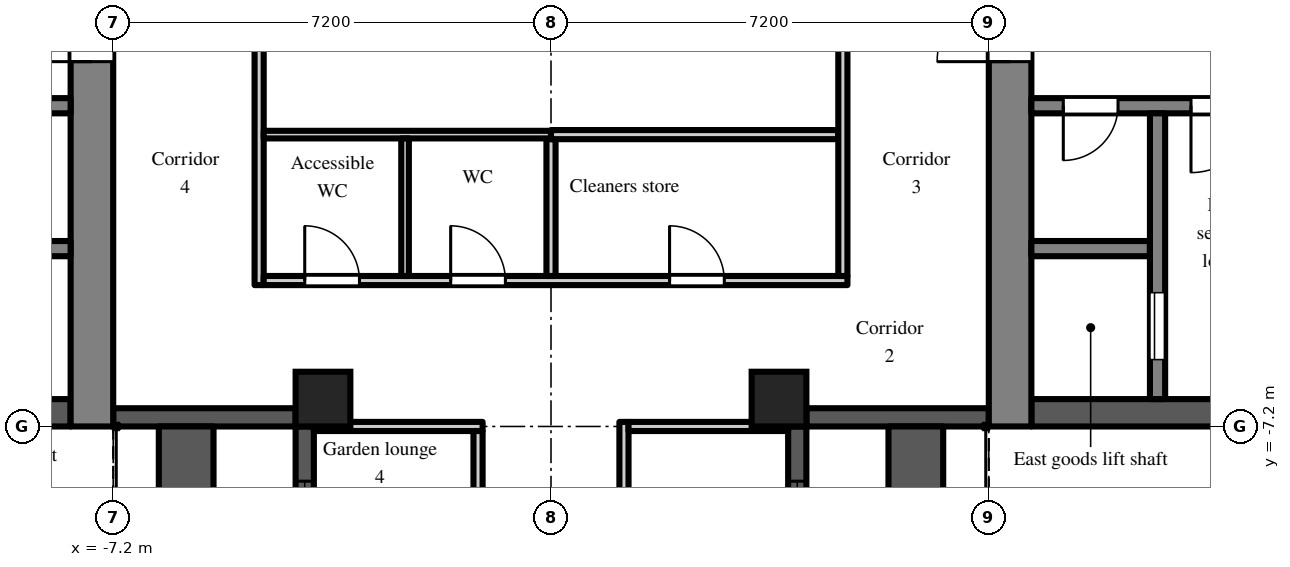
"""IFC4 building model, lengths in metres.
Left out: names, types, materials, properties, quantities, classifications, styles, units other than length and angle.
Written with IfcOpenShell. Run it as: python <this file> out.ifc"""

import sys

from ifc_helpers import new_model, si_unit, direction, frame, frame_2d, origin, origin_2d, place, context, subcontext, project, spatial, rectangle, extrude, element, fill, save


model = new_model("IFC4")
c1 = context("Model", 3, precision=1e-05, world=origin(), true_north=direction((0.0, 1.0)))
c2 = subcontext(c1, "Body", "Model", "MODEL_VIEW")
j1 = project(units=[si_unit("LENGTHUNIT", "METRE"), si_unit("PLANEANGLEUNIT", "RADIAN")], contexts=[c1])
p1 = place(None, origin())
s1 = spatial("IfcSite", under=j1, at=p1, CompositionType="ELEMENT")
p2 = place(p1, origin())
s2 = spatial("IfcBuilding", under=s1, at=p2, CompositionType="ELEMENT")
p3 = place(p2, frame((0.0, 0.0, 120.3)))
s3 = spatial("IfcBuildingStorey", under=s2, at=p3, CompositionType="ELEMENT", Elevation=120.3)
for number, where, z_axis, x_axis in (
    (1, (-3.75, -6.75, 0.0), (0.0, 0.0, 1.0), (1.0, 0.0, 0.0)),
    (2, (3.75, -6.75, 0.0), (0.0, 0.0, 1.0), (1.0, 0.0, 0.0)),
):
    element("IfcColumn", number, at=place(p3, frame(where, z_axis=z_axis, x_axis=x_axis)), inside=s3, PredefinedType="COLUMN", context=c2, shape_type="SweptSolid", body=[
        extrude(rectangle(XDim=0.9, YDim=0.9, at=origin_2d()), origin(), (0.0, 0.0, 1.0), 3.0),
    ])
p4 = place(p3, frame((-7.2, -7.05, 0.0), z_axis=(0.0, 0.0, 1.0), x_axis=(1.0, 0.0, 0.0)))
e3 = element("IfcWall", 3, at=p4, inside=s3, PredefinedType="SOLIDWALL", context=c2, shape_type="SweptSolid", body=[
    extrude(rectangle(XDim=3.0, YDim=0.3, at=frame_2d((1.5, 0.0))), origin(), (0.0, 0.0, 1.0), 2.2),
])
p5 = place(p3, frame((-4.05, -7.2, 0.0), z_axis=(0.0, 0.0, 1.0), x_axis=(0.0, -1.0, 0.0)))
e4 = element("IfcWall", 4, at=p5, inside=s3, PredefinedType="SOLIDWALL", context=c2, shape_type="SweptSolid", body=[
    extrude(rectangle(XDim=7.2, YDim=0.3, at=frame_2d((3.6, 0.0))), origin(), (0.0, 0.0, 1.0), 2.2),
])
p6 = place(p5, frame((3.0, 0.0, 0.0)))
e5 = element("IfcOpeningElement", 5, at=p6, cuts=e4, PredefinedType="OPENING", context=c2, shape_type="SweptSolid", body=[
    extrude(rectangle(XDim=1.2, YDim=2.05, at=frame_2d((0.6, 1.025))), frame((0.0, 0.16, 0.0), z_axis=(0.0, -1.0, 0.0), x_axis=(1.0, 0.0, 0.0)), (0.0, 0.0, 1.0), 0.32),
])
p7 = place(p5, frame((0.9, 0.0, 0.2)))
e6 = element("IfcOpeningElement", 6, at=p7, cuts=e4, PredefinedType="OPENING", context=c2, shape_type="SweptSolid", body=[
    extrude(rectangle(XDim=1.8, YDim=1.85, at=frame_2d((0.9, 0.925))), frame((0.0, 0.16, 0.0), z_axis=(0.0, -1.0, 0.0), x_axis=(1.0, 0.0, 0.0)), (0.0, 0.0, 1.0), 0.32),
])
p8 = place(p5, frame((4.5, 0.0, 0.2)))
e7 = element("IfcOpeningElement", 7, at=p8, cuts=e4, PredefinedType="OPENING", context=c2, shape_type="SweptSolid", body=[
    extrude(rectangle(XDim=1.8, YDim=1.85, at=frame_2d((0.9, 0.925))), frame((0.0, 0.16, 0.0), z_axis=(0.0, -1.0, 0.0), x_axis=(1.0, 0.0, 0.0)), (0.0, 0.0, 1.0), 0.32),
])
p9 = place(p3, frame((4.05, -14.4, 0.0), z_axis=(0.0, 0.0, 1.0), x_axis=(0.0, 1.0, 0.0)))
e8 = element("IfcWall", 8, at=p9, inside=s3, PredefinedType="SOLIDWALL", context=c2, shape_type="SweptSolid", body=[
    extrude(rectangle(XDim=7.2, YDim=0.3, at=frame_2d((3.6, 0.0))), origin(), (0.0, 0.0, 1.0), 2.2),
])
p10 = place(p9, frame((3.0, 0.0, 0.0)))
e9 = element("IfcOpeningElement", 9, at=p10, cuts=e8, PredefinedType="OPENING", context=c2, shape_type="SweptSolid", body=[
    extrude(rectangle(XDim=1.2, YDim=2.05, at=frame_2d((0.6, 1.025))), frame((0.0, 0.16, 0.0), z_axis=(0.0, -1.0, 0.0), x_axis=(1.0, 0.0, 0.0)), (0.0, 0.0, 1.0), 0.32),
])
p11 = place(p9, frame((0.9, 0.0, 0.2)))
e10 = element("IfcOpeningElement", 10, at=p11, cuts=e8, PredefinedType="OPENING", context=c2, shape_type="SweptSolid", body=[
    extrude(rectangle(XDim=1.8, YDim=1.85, at=frame_2d((0.9, 0.925))), frame((0.0, 0.16, 0.0), z_axis=(0.0, -1.0, 0.0), x_axis=(1.0, 0.0, 0.0)), (0.0, 0.0, 1.0), 0.32),
])
p12 = place(p9, frame((4.5, 0.0, 0.2)))
e11 = element("IfcOpeningElement", 11, at=p12, cuts=e8, PredefinedType="OPENING", context=c2, shape_type="SweptSolid", body=[
    extrude(rectangle(XDim=1.8, YDim=1.85, at=frame_2d((0.9, 0.925))), frame((0.0, 0.16, 0.0), z_axis=(0.0, -1.0, 0.0), x_axis=(1.0, 0.0, 0.0)), (0.0, 0.0, 1.0), 0.32),
])
p13 = place(p3, frame((4.2, -7.05, 0.0), z_axis=(0.0, 0.0, 1.0), x_axis=(1.0, 0.0, 0.0)))
e12 = element("IfcWall", 12, at=p13, inside=s3, PredefinedType="SOLIDWALL", context=c2, shape_type="SweptSolid", body=[
    extrude(rectangle(XDim=3.0, YDim=0.3, at=frame_2d((1.5, 0.0))), origin(), (0.0, 0.0, 1.0), 2.2),
])
for number, where, z_axis, x_axis in (
    (13, (6.0, -14.4, 0.0), (0.0, 0.0, 1.0), (0.0, 1.0, 0.0)),
    (14, (-6.0, -14.4, 0.0), (0.0, 0.0, 1.0), (0.0, 1.0, 0.0)),
):
    element("IfcWall", number, at=place(p3, frame(where, z_axis=z_axis, x_axis=x_axis)), inside=s3, PredefinedType="PARAPET", context=c2, shape_type="SweptSolid", body=[
        extrude(rectangle(XDim=7.2, YDim=0.9, at=frame_2d((3.6, 0.0))), origin(), (0.0, 0.0, 1.0), 0.8),
    ])
p14 = place(p3, frame((7.55, -7.2, 0.0), z_axis=(0.0, 0.0, 1.0), x_axis=(0.0, 1.0, 0.0)))
e15 = element("IfcWall", 15, at=p14, inside=s3, PredefinedType="SHEAR", context=c2, shape_type="SweptSolid", body=[
    extrude(rectangle(XDim=14.4, YDim=0.7, at=frame_2d((7.2, 0.0))), origin(), (0.0, 0.0, 1.0), 2.6),
])
p15 = place(p14, frame((6.0, 0.0, 0.0)))
e16 = element("IfcOpeningElement", 16, at=p15, cuts=e15, PredefinedType="OPENING", context=c2, shape_type="SweptSolid", body=[
    extrude(rectangle(XDim=2.4, YDim=2.2, at=frame_2d((1.2, 1.1))), frame((0.0, 0.36, 0.0), z_axis=(0.0, -1.0, 0.0), x_axis=(1.0, 0.0, 0.0)), (0.0, 0.0, 1.0), 0.72),
])
p16 = place(p3, frame((7.9, -6.975, 0.0), z_axis=(0.0, 0.0, 1.0), x_axis=(1.0, 0.0, 0.0)))
e17 = element("IfcWall", 17, at=p16, inside=s3, PredefinedType="SHEAR", context=c2, shape_type="SweptSolid", body=[
    extrude(rectangle(XDim=12.95, YDim=0.45, at=frame_2d((6.475, 0.0))), origin(), (0.0, 0.0, 1.0), 2.6),
])
p17 = place(p3, frame((7.9, -1.925, 0.0), z_axis=(0.0, 0.0, 1.0), x_axis=(1.0, 0.0, 0.0)))
e18 = element("IfcWall", 18, at=p17, inside=s3, PredefinedType="SHEAR", context=c2, shape_type="SweptSolid", body=[
    extrude(rectangle(XDim=12.95, YDim=0.25, at=frame_2d((6.475, 0.0))), origin(), (0.0, 0.0, 1.0), 2.6),
])
p18 = place(p17, frame((0.525, 0.0, 0.0)))
e19 = element("IfcOpeningElement", 19, at=p18, cuts=e18, PredefinedType="OPENING", context=c2, shape_type="SweptSolid", body=[
    extrude(rectangle(XDim=0.9, YDim=2.1, at=frame_2d((0.45, 1.05))), frame((0.0, 0.135, 0.0), z_axis=(0.0, -1.0, 0.0), x_axis=(1.0, 0.0, 0.0)), (0.0, 0.0, 1.0), 0.27),
])
p19 = place(p17, frame((2.625, 0.0, 0.0)))
e20 = element("IfcOpeningElement", 20, at=p19, cuts=e18, PredefinedType="OPENING", context=c2, shape_type="SweptSolid", body=[
    extrude(rectangle(XDim=1.1, YDim=2.1, at=frame_2d((0.55, 1.05))), frame((0.0, 0.135, 0.0), z_axis=(0.0, -1.0, 0.0), x_axis=(1.0, 0.0, 0.0)), (0.0, 0.0, 1.0), 0.27),
])
p20 = place(p3, frame((7.9, -4.275, 0.0), z_axis=(0.0, 0.0, 1.0), x_axis=(1.0, 0.0, 0.0)))
e21 = element("IfcWall", 21, at=p20, inside=s3, PredefinedType="SHEAR", context=c2, shape_type="SweptSolid", body=[
    extrude(rectangle(XDim=1.95, YDim=0.25, at=frame_2d((0.975, 0.0))), origin(), (0.0, 0.0, 1.0), 2.6),
])
p21 = place(p3, frame((9.975, -2.05, 0.0), z_axis=(0.0, 0.0, 1.0), x_axis=(0.0, -1.0, 0.0)))
e22 = element("IfcWall", 22, at=p21, inside=s3, PredefinedType="SHEAR", context=c2, shape_type="SweptSolid", body=[
    extrude(rectangle(XDim=4.7, YDim=0.25, at=frame_2d((2.35, 0.0))), origin(), (0.0, 0.0, 1.0), 2.6),
])
p22 = place(p21, frame((2.95, 0.0, 0.0)))
e23 = element("IfcOpeningElement", 23, at=p22, cuts=e22, PredefinedType="OPENING", context=c2, shape_type="SweptSolid", body=[
    extrude(rectangle(XDim=1.1, YDim=2.1, at=frame_2d((0.55, 1.05))), frame((0.0, 0.135, 0.0), z_axis=(0.0, -1.0, 0.0), x_axis=(1.0, 0.0, 0.0)), (0.0, 0.0, 1.0), 0.27),
])
p23 = place(p3, frame((-7.55, -7.2, 0.0), z_axis=(0.0, 0.0, 1.0), x_axis=(0.0, 1.0, 0.0)))
e24 = element("IfcWall", 24, at=p23, inside=s3, PredefinedType="SHEAR", context=c2, shape_type="SweptSolid", body=[
    extrude(rectangle(XDim=14.4, YDim=0.7, at=frame_2d((7.2, 0.0))), origin(), (0.0, 0.0, 1.0), 2.6),
])
p24 = place(p23, frame((6.0, 0.0, 0.0)))
e25 = element("IfcOpeningElement", 25, at=p24, cuts=e24, PredefinedType="OPENING", context=c2, shape_type="SweptSolid", body=[
    extrude(rectangle(XDim=2.4, YDim=2.2, at=frame_2d((1.2, 1.1))), frame((0.0, 0.36, 0.0), z_axis=(0.0, -1.0, 0.0), x_axis=(1.0, 0.0, 0.0)), (0.0, 0.0, 1.0), 0.72),
])
p25 = place(p3, frame((-7.9, -6.975, 0.0), z_axis=(0.0, 0.0, 1.0), x_axis=(-1.0, 0.0, 0.0)))
e26 = element("IfcWall", 26, at=p25, inside=s3, PredefinedType="SHEAR", context=c2, shape_type="SweptSolid", body=[
    extrude(rectangle(XDim=12.95, YDim=0.45, at=frame_2d((6.475, 0.0))), origin(), (0.0, 0.0, 1.0), 2.6),
])
p26 = place(p3, frame((-7.9, -1.925, 0.0), z_axis=(0.0, 0.0, 1.0), x_axis=(-1.0, 0.0, 0.0)))
e27 = element("IfcWall", 27, at=p26, inside=s3, PredefinedType="SHEAR", context=c2, shape_type="SweptSolid", body=[
    extrude(rectangle(XDim=12.95, YDim=0.25, at=frame_2d((6.475, 0.0))), origin(), (0.0, 0.0, 1.0), 2.6),
])
p27 = place(p26, frame((0.525, 0.0, 0.0)))
e28 = element("IfcOpeningElement", 28, at=p27, cuts=e27, PredefinedType="OPENING", context=c2, shape_type="SweptSolid", body=[
    extrude(rectangle(XDim=0.9, YDim=2.1, at=frame_2d((0.45, 1.05))), frame((0.0, 0.135, 0.0), z_axis=(0.0, -1.0, 0.0), x_axis=(1.0, 0.0, 0.0)), (0.0, 0.0, 1.0), 0.27),
])
p28 = place(p26, frame((2.625, 0.0, 0.0)))
e29 = element("IfcOpeningElement", 29, at=p28, cuts=e27, PredefinedType="OPENING", context=c2, shape_type="SweptSolid", body=[
    extrude(rectangle(XDim=1.1, YDim=2.1, at=frame_2d((0.55, 1.05))), frame((0.0, 0.135, 0.0), z_axis=(0.0, -1.0, 0.0), x_axis=(1.0, 0.0, 0.0)), (0.0, 0.0, 1.0), 0.27),
])
p29 = place(p3, frame((-7.9, -4.275, 0.0), z_axis=(0.0, 0.0, 1.0), x_axis=(-1.0, 0.0, 0.0)))
e30 = element("IfcWall", 30, at=p29, inside=s3, PredefinedType="SHEAR", context=c2, shape_type="SweptSolid", body=[
    extrude(rectangle(XDim=1.95, YDim=0.25, at=frame_2d((0.975, 0.0))), origin(), (0.0, 0.0, 1.0), 2.6),
])
p30 = place(p3, frame((-4.8, -4.875, 0.0), z_axis=(0.0, 0.0, 1.0), x_axis=(0.0, 1.0, 0.0)))
e31 = element("IfcWall", 31, at=p30, inside=s3, PredefinedType="PARTITIONING", context=c2, shape_type="SweptSolid", body=[
    extrude(rectangle(XDim=9.75, YDim=0.15, at=frame_2d((4.875, 0.0))), origin(), (0.0, 0.0, 1.0), 2.6),
])
p31 = place(p3, frame((-4.725, -4.8, 0.0), z_axis=(0.0, 0.0, 1.0), x_axis=(1.0, 0.0, 0.0)))
e32 = element("IfcWall", 32, at=p31, inside=s3, PredefinedType="PARTITIONING", context=c2, shape_type="SweptSolid", body=[
    extrude(rectangle(XDim=9.6, YDim=0.15, at=frame_2d((4.8, 0.0))), origin(), (0.0, 0.0, 1.0), 2.6),
])
p32 = place(p31, frame((0.675, 0.0, 0.0)))
e33 = element("IfcOpeningElement", 33, at=p32, cuts=e32, PredefinedType="OPENING", context=c2, shape_type="SweptSolid", body=[
    extrude(rectangle(XDim=0.9, YDim=2.1, at=frame_2d((0.45, 1.05))), frame((0.0, 0.085, 0.0), z_axis=(0.0, -1.0, 0.0), x_axis=(1.0, 0.0, 0.0)), (0.0, 0.0, 1.0), 0.17),
])
p33 = place(p31, frame((3.075, 0.0, 0.0)))
e34 = element("IfcOpeningElement", 34, at=p33, cuts=e32, PredefinedType="OPENING", context=c2, shape_type="SweptSolid", body=[
    extrude(rectangle(XDim=0.9, YDim=2.1, at=frame_2d((0.45, 1.05))), frame((0.0, 0.085, 0.0), z_axis=(0.0, -1.0, 0.0), x_axis=(1.0, 0.0, 0.0)), (0.0, 0.0, 1.0), 0.17),
])
p34 = place(p31, frame((6.675, 0.0, 0.0)))
e35 = element("IfcOpeningElement", 35, at=p34, cuts=e32, PredefinedType="OPENING", context=c2, shape_type="SweptSolid", body=[
    extrude(rectangle(XDim=0.9, YDim=2.1, at=frame_2d((0.45, 1.05))), frame((0.0, 0.085, 0.0), z_axis=(0.0, -1.0, 0.0), x_axis=(1.0, 0.0, 0.0)), (0.0, 0.0, 1.0), 0.17),
])
p35 = place(p3, frame((-4.725, -2.4, 0.0), z_axis=(0.0, 0.0, 1.0), x_axis=(1.0, 0.0, 0.0)))
e36 = element("IfcWall", 36, at=p35, inside=s3, PredefinedType="PARTITIONING", context=c2, shape_type="SweptSolid", body=[
    extrude(rectangle(XDim=4.725, YDim=0.125, at=frame_2d((2.363, 0.0))), origin(), (0.0, 0.0, 1.0), 2.6),
])
p36 = place(p3, frame((-3.9, -7.2, 0.0), z_axis=(0.0, 0.0, 1.0), x_axis=(1.0, 0.0, 0.0)))
e37 = element("IfcWall", 37, at=p36, inside=s3, PredefinedType="PARTITIONING", context=c2, shape_type="SweptSolid", body=[
    extrude(rectangle(XDim=2.775, YDim=0.15, at=frame_2d((1.387, 0.0))), origin(), (0.0, 0.0, 1.0), 2.6),
])
p37 = place(p3, frame((-2.4, -4.725, 0.0), z_axis=(0.0, 0.0, 1.0), x_axis=(0.0, 1.0, 0.0)))
e38 = element("IfcWall", 38, at=p37, inside=s3, PredefinedType="PARTITIONING", context=c2, shape_type="SweptSolid", body=[
    extrude(rectangle(XDim=2.263, YDim=0.125, at=frame_2d((1.131, 0.0))), origin(), (0.0, 0.0, 1.0), 2.6),
])
p38 = place(p3, frame((-1.2, -21.3, 0.0), z_axis=(0.0, 0.0, 1.0), x_axis=(0.0, 1.0, 0.0)))
e39 = element("IfcWall", 39, at=p38, inside=s3, PredefinedType="PARTITIONING", context=c2, shape_type="SweptSolid", body=[
    extrude(rectangle(XDim=14.025, YDim=0.15, at=frame_2d((7.013, 0.0))), origin(), (0.0, 0.0, 1.0), 2.6),
])
p39 = place(p38, frame((11.85, 0.0, 0.0)))
e40 = element("IfcOpeningElement", 40, at=p39, cuts=e39, PredefinedType="OPENING", context=c2, shape_type="SweptSolid", body=[
    extrude(rectangle(XDim=0.9, YDim=2.1, at=frame_2d((0.45, 1.05))), frame((0.0, 0.085, 0.0), z_axis=(0.0, -1.0, 0.0), x_axis=(1.0, 0.0, 0.0)), (0.0, 0.0, 1.0), 0.17),
])
p40 = place(p38, frame((5.7, 0.0, 0.0)))
e41 = element("IfcOpeningElement", 41, at=p40, cuts=e39, PredefinedType="OPENING", context=c2, shape_type="SweptSolid", body=[
    extrude(rectangle(XDim=1.0, YDim=2.1, at=frame_2d((0.5, 1.05))), frame((0.0, 0.085, 0.0), z_axis=(0.0, -1.0, 0.0), x_axis=(1.0, 0.0, 0.0)), (0.0, 0.0, 1.0), 0.17),
])
p41 = place(p38, frame((1.2, 0.0, 0.0)))
e42 = element("IfcOpeningElement", 42, at=p41, cuts=e39, PredefinedType="OPENING", context=c2, shape_type="SweptSolid", body=[
    extrude(rectangle(XDim=0.9, YDim=2.1, at=frame_2d((0.45, 1.05))), frame((0.0, 0.085, 0.0), z_axis=(0.0, -1.0, 0.0), x_axis=(1.0, 0.0, 0.0)), (0.0, 0.0, 1.0), 0.17),
])
p42 = place(p3, frame((0.0, -4.725, 0.0), z_axis=(0.0, 0.0, 1.0), x_axis=(0.0, 1.0, 0.0)))
e43 = element("IfcWall", 43, at=p42, inside=s3, PredefinedType="PARTITIONING", context=c2, shape_type="SweptSolid", body=[
    extrude(rectangle(XDim=2.25, YDim=0.15, at=frame_2d((1.125, 0.0))), origin(), (0.0, 0.0, 1.0), 2.6),
])
p43 = place(p3, frame((0.0, -2.4, 0.0), z_axis=(0.0, 0.0, 1.0), x_axis=(1.0, 0.0, 0.0)))
e44 = element("IfcWall", 44, at=p43, inside=s3, PredefinedType="PARTITIONING", context=c2, shape_type="SweptSolid", body=[
    extrude(rectangle(XDim=4.725, YDim=0.15, at=frame_2d((2.363, 0.0))), origin(), (0.0, 0.0, 1.0), 2.6),
])
p44 = place(p3, frame((1.2, -21.3, 0.0), z_axis=(0.0, 0.0, 1.0), x_axis=(0.0, 1.0, 0.0)))
e45 = element("IfcWall", 45, at=p44, inside=s3, PredefinedType="PARTITIONING", context=c2, shape_type="SweptSolid", body=[
    extrude(rectangle(XDim=14.175, YDim=0.15, at=frame_2d((7.087, 0.0))), origin(), (0.0, 0.0, 1.0), 2.6),
])
p45 = place(p44, frame((8.25, 0.0, 0.0)))
e46 = element("IfcOpeningElement", 46, at=p45, cuts=e45, PredefinedType="OPENING", context=c2, shape_type="SweptSolid", body=[
    extrude(rectangle(XDim=0.9, YDim=2.1, at=frame_2d((0.45, 1.05))), frame((0.0, 0.085, 0.0), z_axis=(0.0, -1.0, 0.0), x_axis=(1.0, 0.0, 0.0)), (0.0, 0.0, 1.0), 0.17),
])
p46 = place(p44, frame((5.55, 0.0, 0.0)))
e47 = element("IfcOpeningElement", 47, at=p46, cuts=e45, PredefinedType="OPENING", context=c2, shape_type="SweptSolid", body=[
    extrude(rectangle(XDim=0.9, YDim=2.1, at=frame_2d((0.45, 1.05))), frame((0.0, 0.085, 0.0), z_axis=(0.0, -1.0, 0.0), x_axis=(1.0, 0.0, 0.0)), (0.0, 0.0, 1.0), 0.17),
])
p47 = place(p44, frame((3.75, 0.0, 0.0)))
e48 = element("IfcOpeningElement", 48, at=p47, cuts=e45, PredefinedType="OPENING", context=c2, shape_type="SweptSolid", body=[
    extrude(rectangle(XDim=0.9, YDim=2.1, at=frame_2d((0.45, 1.05))), frame((0.0, 0.085, 0.0), z_axis=(0.0, -1.0, 0.0), x_axis=(1.0, 0.0, 0.0)), (0.0, 0.0, 1.0), 0.17),
])
p48 = place(p44, frame((1.95, 0.0, 0.0)))
e49 = element("IfcOpeningElement", 49, at=p48, cuts=e45, PredefinedType="OPENING", context=c2, shape_type="SweptSolid", body=[
    extrude(rectangle(XDim=0.9, YDim=2.1, at=frame_2d((0.45, 1.05))), frame((0.0, 0.085, 0.0), z_axis=(0.0, -1.0, 0.0), x_axis=(1.0, 0.0, 0.0)), (0.0, 0.0, 1.0), 0.17),
])
p49 = place(p44, frame((0.3, 0.0, 0.0)))
e50 = element("IfcOpeningElement", 50, at=p49, cuts=e45, PredefinedType="OPENING", context=c2, shape_type="SweptSolid", body=[
    extrude(rectangle(XDim=0.9, YDim=2.1, at=frame_2d((0.45, 1.05))), frame((0.0, 0.085, 0.0), z_axis=(0.0, -1.0, 0.0), x_axis=(1.0, 0.0, 0.0)), (0.0, 0.0, 1.0), 0.17),
])
p50 = place(p3, frame((1.275, -7.2, 0.0), z_axis=(0.0, 0.0, 1.0), x_axis=(1.0, 0.0, 0.0)))
e51 = element("IfcWall", 51, at=p50, inside=s3, PredefinedType="PARTITIONING", context=c2, shape_type="SweptSolid", body=[
    extrude(rectangle(XDim=2.625, YDim=0.15, at=frame_2d((1.312, 0.0))), origin(), (0.0, 0.0, 1.0), 2.6),
])
p51 = place(p3, frame((4.8, -4.725, 0.0), z_axis=(0.0, 0.0, 1.0), x_axis=(0.0, 1.0, 0.0)))
e52 = element("IfcWall", 52, at=p51, inside=s3, PredefinedType="PARTITIONING", context=c2, shape_type="SweptSolid", body=[
    extrude(rectangle(XDim=9.45, YDim=0.15, at=frame_2d((4.725, 0.0))), origin(), (0.0, 0.0, 1.0), 2.6),
])
p52 = place(p7, origin())
e53 = element("IfcWindow", 53, at=p52, inside=s3, PartitioningType="SINGLE_PANEL", PredefinedType="WINDOW", context=c2, shape_type="SweptSolid", body=[
    extrude(rectangle(XDim=1.8, YDim=1.85, at=frame_2d((0.9, 0.925))), frame((0.0, 0.03, 0.0), z_axis=(0.0, -1.0, 0.0), x_axis=(1.0, 0.0, 0.0)), (0.0, 0.0, 1.0), 0.06),
])
fill(e6, e53)
p53 = place(p12, origin())
e54 = element("IfcWindow", 54, at=p53, inside=s3, PartitioningType="SINGLE_PANEL", PredefinedType="WINDOW", context=c2, shape_type="SweptSolid", body=[
    extrude(rectangle(XDim=1.8, YDim=1.85, at=frame_2d((0.9, 0.925))), frame((0.0, 0.03, 0.0), z_axis=(0.0, -1.0, 0.0), x_axis=(1.0, 0.0, 0.0)), (0.0, 0.0, 1.0), 0.06),
])
fill(e11, e54)
p54 = place(p22, origin())
e55 = element("IfcDoor", 55, at=p54, inside=s3, OperationType="SLIDING_TO_LEFT", PredefinedType="DOOR", context=c2, shape_type="SweptSolid", body=[
    extrude(rectangle(XDim=1.1, YDim=2.1, at=frame_2d((0.55, 1.05))), frame((0.0, 0.025, 0.0), z_axis=(0.0, -1.0, 0.0), x_axis=(1.0, 0.0, 0.0)), (0.0, 0.0, 1.0), 0.05),
])
fill(e23, e55)
p55 = place(p18, frame((0.9, 0.0, 0.0), z_axis=(0.0, 0.0, 1.0), x_axis=(-1.0, 0.0, 0.0)))
e56 = element("IfcDoor", 56, at=p55, inside=s3, OperationType="SINGLE_SWING_RIGHT", PredefinedType="DOOR", context=c2, shape_type="SweptSolid", body=[
    extrude(rectangle(XDim=0.9, YDim=2.1, at=frame_2d((0.45, 1.05))), frame((0.0, 0.025, 0.0), z_axis=(0.0, -1.0, 0.0), x_axis=(1.0, 0.0, 0.0)), (0.0, 0.0, 1.0), 0.05),
])
fill(e19, e56)
p56 = place(p19, frame((1.1, 0.0, 0.0), z_axis=(0.0, 0.0, 1.0), x_axis=(-1.0, 0.0, 0.0)))
e57 = element("IfcDoor", 57, at=p56, inside=s3, OperationType="SINGLE_SWING_RIGHT", PredefinedType="DOOR", context=c2, shape_type="SweptSolid", body=[
    extrude(rectangle(XDim=1.1, YDim=2.1, at=frame_2d((0.55, 1.05))), frame((0.0, 0.025, 0.0), z_axis=(0.0, -1.0, 0.0), x_axis=(1.0, 0.0, 0.0)), (0.0, 0.0, 1.0), 0.05),
])
fill(e20, e57)
p57 = place(p15, origin())
e58 = element("IfcDoor", 58, at=p57, inside=s3, OperationType="DOUBLE_DOOR_DOUBLE_SWING", PredefinedType="DOOR", context=c2, shape_type="SweptSolid", body=[
    extrude(rectangle(XDim=2.4, YDim=2.2, at=frame_2d((1.2, 1.1))), frame((0.0, 0.025, 0.0), z_axis=(0.0, -1.0, 0.0), x_axis=(1.0, 0.0, 0.0)), (0.0, 0.0, 1.0), 0.05),
])
fill(e16, e58)
p58 = place(p24, origin())
e59 = element("IfcDoor", 59, at=p58, inside=s3, OperationType="DOUBLE_DOOR_DOUBLE_SWING", PredefinedType="DOOR", context=c2, shape_type="SweptSolid", body=[
    extrude(rectangle(XDim=2.4, YDim=2.2, at=frame_2d((1.2, 1.1))), frame((0.0, 0.025, 0.0), z_axis=(0.0, -1.0, 0.0), x_axis=(1.0, 0.0, 0.0)), (0.0, 0.0, 1.0), 0.05),
])
fill(e25, e59)
p59 = place(p32, origin())
e60 = element("IfcDoor", 60, at=p59, inside=s3, OperationType="SINGLE_SWING_LEFT", PredefinedType="DOOR", context=c2, shape_type="SweptSolid", body=[
    extrude(rectangle(XDim=0.9, YDim=2.1, at=frame_2d((0.45, 1.05))), frame((0.0, 0.025, 0.0), z_axis=(0.0, -1.0, 0.0), x_axis=(1.0, 0.0, 0.0)), (0.0, 0.0, 1.0), 0.05),
])
fill(e33, e60)
p60 = place(p33, origin())
e61 = element("IfcDoor", 61, at=p60, inside=s3, OperationType="SINGLE_SWING_LEFT", PredefinedType="DOOR", context=c2, shape_type="SweptSolid", body=[
    extrude(rectangle(XDim=0.9, YDim=2.1, at=frame_2d((0.45, 1.05))), frame((0.0, 0.025, 0.0), z_axis=(0.0, -1.0, 0.0), x_axis=(1.0, 0.0, 0.0)), (0.0, 0.0, 1.0), 0.05),
])
fill(e34, e61)
p61 = place(p34, origin())
e62 = element("IfcDoor", 62, at=p61, inside=s3, OperationType="SINGLE_SWING_LEFT", PredefinedType="DOOR", context=c2, shape_type="SweptSolid", body=[
    extrude(rectangle(XDim=0.9, YDim=2.1, at=frame_2d((0.45, 1.05))), frame((0.0, 0.025, 0.0), z_axis=(0.0, -1.0, 0.0), x_axis=(1.0, 0.0, 0.0)), (0.0, 0.0, 1.0), 0.05),
])
fill(e35, e62)
save(model, sys.argv[1])
